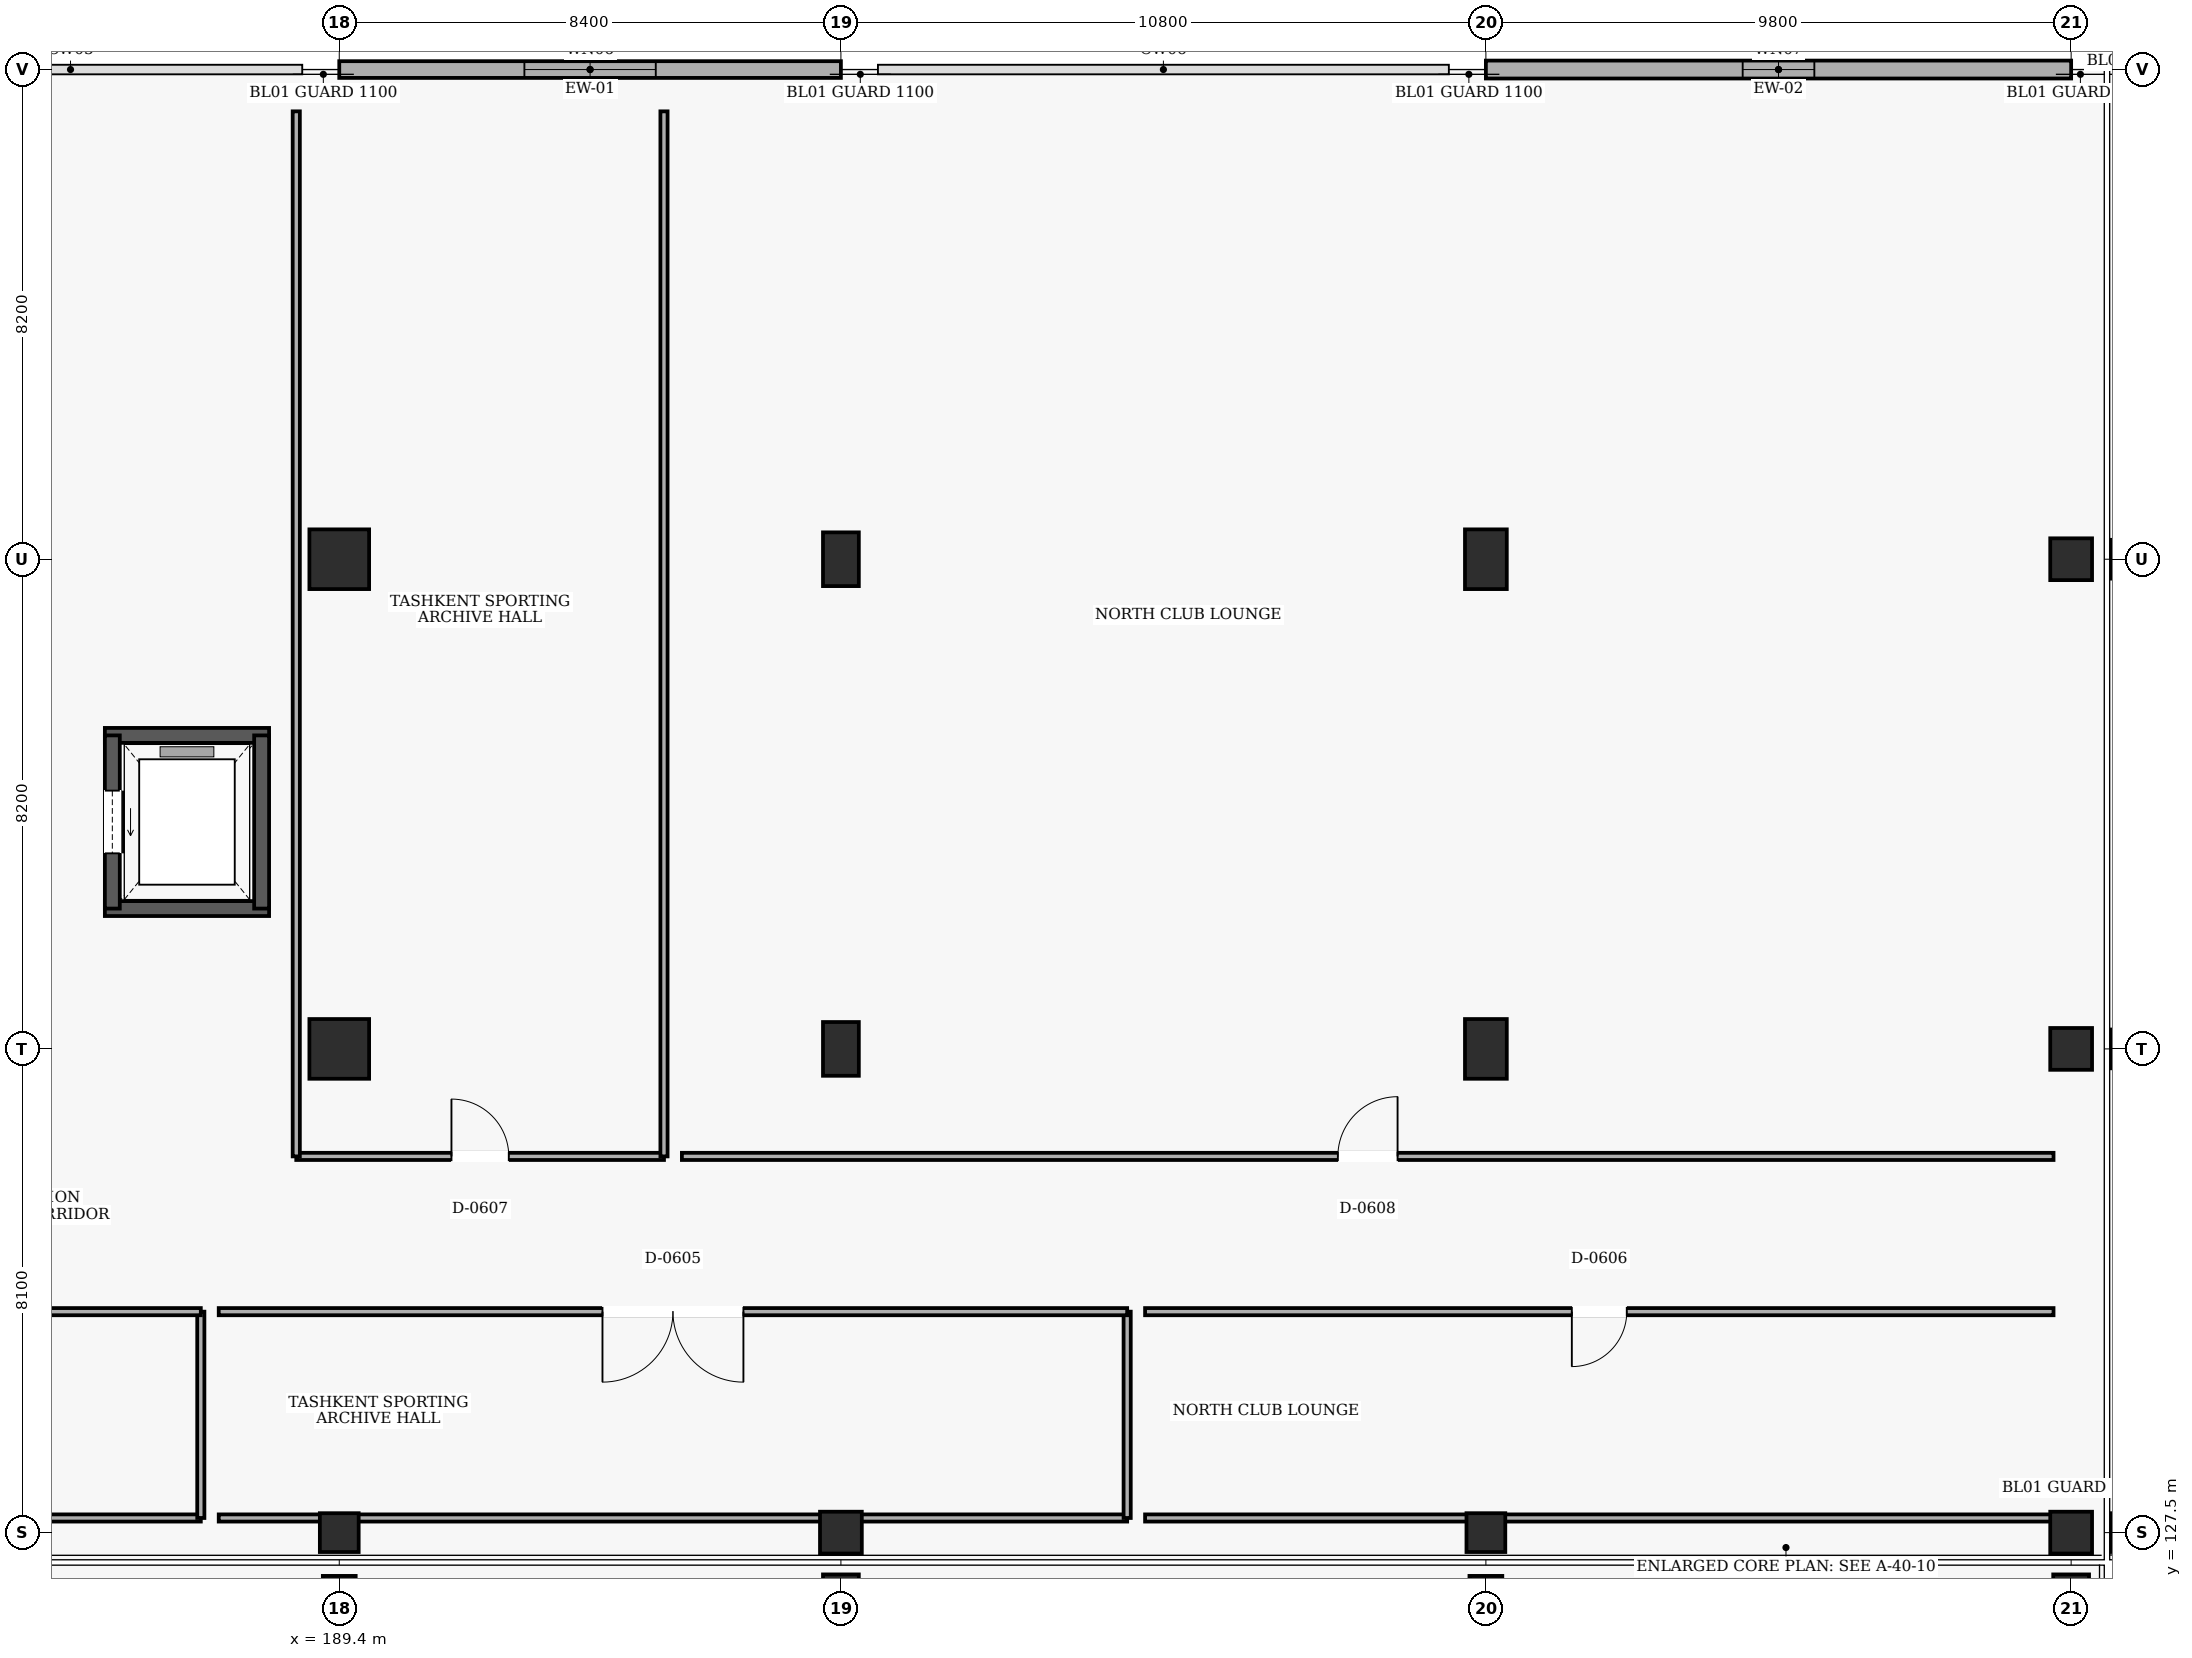
"""IFC4 building model, lengths in metres.
Left out: names, types, materials, properties, quantities, classifications, styles, units other than length and angle.
Written with IfcOpenShell. Run it as: python <this file> out.ifc"""

import sys

from ifc_helpers import new_model, si_unit, direction, frame, frame_2d, origin, origin_2d, place, context, subcontext, project, spatial, rectangle, extrude, element, fill, save


model = new_model("IFC4")
c1 = context("Model", 3, precision=1e-05, world=origin(), true_north=direction((0.0, 1.0)))
c2 = subcontext(c1, "Body", "Model", "MODEL_VIEW")
j1 = project(units=[si_unit("LENGTHUNIT", "METRE"), si_unit("PLANEANGLEUNIT", "RADIAN")], contexts=[c1])
p1 = place(None, origin())
s1 = spatial("IfcSite", under=j1, at=p1, CompositionType="ELEMENT")
p2 = place(p1, origin())
s2 = spatial("IfcBuilding", under=s1, at=p2, CompositionType="ELEMENT")
p3 = place(p2, frame((0.0, 0.0, 10.2)))
s3 = spatial("IfcBuildingStorey", under=s2, at=p3, CompositionType="ELEMENT", Elevation=10.2)
p4 = place(p3, frame((189.4, 126.5, 0.0), z_axis=(0.0, 0.0, 1.0), x_axis=(1.0, 0.0, 0.0)))
e1 = element("IfcColumn", 1, at=p4, inside=s3, PredefinedType="COLUMN", context=c2, shape_type="SweptSolid", body=[
    extrude(rectangle(XDim=0.55, YDim=0.55, at=origin_2d()), origin(), (0.0, 0.0, 1.0), 4.8),
])
p5 = place(p3, frame((189.4, 127.5, 0.0), z_axis=(0.0, 0.0, 1.0), x_axis=(1.0, 0.0, 0.0)))
e2 = element("IfcColumn", 2, at=p5, inside=s3, PredefinedType="COLUMN", context=c2, shape_type="SweptSolid", body=[
    extrude(rectangle(XDim=0.65, YDim=0.65, at=origin_2d()), origin(), (0.0, 0.0, 1.0), 4.8),
])
for number, where, z_axis, x_axis in (
    (3, (189.4, 135.6, 0.0), (0.0, 0.0, 1.0), (1.0, 0.0, 0.0)),
    (4, (189.4, 143.8, 0.0), (0.0, 0.0, 1.0), (1.0, 0.0, 0.0)),
):
    element("IfcColumn", number, at=place(p3, frame(where, z_axis=z_axis, x_axis=x_axis)), inside=s3, PredefinedType="COLUMN", context=c2, shape_type="SweptSolid", body=[
        extrude(rectangle(XDim=1.0, YDim=1.0, at=origin_2d()), origin(), (0.0, 0.0, 1.0), 4.8),
    ])
p6 = place(p3, frame((197.8, 126.5, 0.0), z_axis=(0.0, 0.0, 1.0), x_axis=(1.0, 0.0, 0.0)))
e5 = element("IfcColumn", 5, at=p6, inside=s3, PredefinedType="COLUMN", context=c2, shape_type="SweptSolid", body=[
    extrude(rectangle(XDim=0.6, YDim=0.6, at=origin_2d()), origin(), (0.0, 0.0, 1.0), 4.8),
])
p7 = place(p3, frame((197.8, 127.5, 0.0), z_axis=(0.0, 0.0, 1.0), x_axis=(1.0, 0.0, 0.0)))
e6 = element("IfcColumn", 6, at=p7, inside=s3, PredefinedType="COLUMN", context=c2, shape_type="SweptSolid", body=[
    extrude(rectangle(XDim=0.7, YDim=0.7, at=origin_2d()), origin(), (0.0, 0.0, 1.0), 4.8),
])
for number, where, z_axis, x_axis in (
    (7, (197.8, 135.6, 0.0), (0.0, 0.0, 1.0), (1.0, 0.0, 0.0)),
    (8, (197.8, 143.8, 0.0), (0.0, 0.0, 1.0), (1.0, 0.0, 0.0)),
):
    element("IfcColumn", number, at=place(p3, frame(where, z_axis=z_axis, x_axis=x_axis)), inside=s3, PredefinedType="COLUMN", context=c2, shape_type="SweptSolid", body=[
        extrude(rectangle(XDim=0.6, YDim=0.9, at=origin_2d()), origin(), (0.0, 0.0, 1.0), 4.8),
    ])
p8 = place(p3, frame((208.6, 126.5, 0.0), z_axis=(0.0, 0.0, 1.0), x_axis=(1.0, 0.0, 0.0)))
e9 = element("IfcColumn", 9, at=p8, inside=s3, PredefinedType="COLUMN", context=c2, shape_type="SweptSolid", body=[
    extrude(rectangle(XDim=0.55, YDim=0.55, at=origin_2d()), origin(), (0.0, 0.0, 1.0), 4.8),
])
p9 = place(p3, frame((208.6, 127.5, 0.0), z_axis=(0.0, 0.0, 1.0), x_axis=(1.0, 0.0, 0.0)))
e10 = element("IfcColumn", 10, at=p9, inside=s3, PredefinedType="COLUMN", context=c2, shape_type="SweptSolid", body=[
    extrude(rectangle(XDim=0.65, YDim=0.65, at=origin_2d()), origin(), (0.0, 0.0, 1.0), 4.8),
])
for number, where, z_axis, x_axis in (
    (11, (208.6, 135.6, 0.0), (0.0, 0.0, 1.0), (1.0, 0.0, 0.0)),
    (12, (208.6, 143.8, 0.0), (0.0, 0.0, 1.0), (1.0, 0.0, 0.0)),
):
    element("IfcColumn", number, at=place(p3, frame(where, z_axis=z_axis, x_axis=x_axis)), inside=s3, PredefinedType="COLUMN", context=c2, shape_type="SweptSolid", body=[
        extrude(rectangle(XDim=0.7, YDim=1.0, at=origin_2d()), origin(), (0.0, 0.0, 1.0), 4.8),
    ])
p10 = place(p3, frame((218.4, 126.5, 0.0), z_axis=(0.0, 0.0, 1.0), x_axis=(1.0, 0.0, 0.0)))
e13 = element("IfcColumn", 13, at=p10, inside=s3, PredefinedType="COLUMN", context=c2, shape_type="SweptSolid", body=[
    extrude(rectangle(XDim=0.6, YDim=0.6, at=origin_2d()), origin(), (0.0, 0.0, 1.0), 4.8),
])
for number, where, z_axis, x_axis in (
    (14, (218.4, 127.5, 0.0), (0.0, 0.0, 1.0), (1.0, 0.0, 0.0)),
    (15, (218.4, 135.6, 0.0), (0.0, 0.0, 1.0), (1.0, 0.0, 0.0)),
    (16, (218.4, 143.8, 0.0), (0.0, 0.0, 1.0), (1.0, 0.0, 0.0)),
):
    element("IfcColumn", number, at=place(p3, frame(where, z_axis=z_axis, x_axis=x_axis)), inside=s3, PredefinedType="COLUMN", context=c2, shape_type="SweptSolid", body=[
        extrude(rectangle(XDim=0.7, YDim=0.7, at=origin_2d()), origin(), (0.0, 0.0, 1.0), 4.8),
    ])
for number, where, z_axis, x_axis in (
    (17, (219.4, 127.5, 0.0), (0.0, 0.0, 1.0), (1.0, 0.0, 0.0)),
    (18, (219.4, 135.6, 0.0), (0.0, 0.0, 1.0), (1.0, 0.0, 0.0)),
    (19, (219.4, 143.8, 0.0), (0.0, 0.0, 1.0), (1.0, 0.0, 0.0)),
):
    element("IfcColumn", number, at=place(p3, frame(where, z_axis=z_axis, x_axis=x_axis)), inside=s3, PredefinedType="COLUMN", context=c2, shape_type="SweptSolid", body=[
        extrude(rectangle(XDim=0.65, YDim=0.65, at=origin_2d()), origin(), (0.0, 0.0, 1.0), 4.8),
    ])
p11 = place(p3, frame((189.4, 152.0, 0.0), z_axis=(0.0, 0.0, 1.0), x_axis=(1.0, 0.0, 0.0)))
e20 = element("IfcWall", 20, at=p11, inside=s3, PredefinedType="SOLIDWALL", context=c2, shape_type="SweptSolid", body=[
    extrude(rectangle(XDim=8.4, YDim=0.28, at=frame_2d((4.2, 0.0))), origin(), (0.0, 0.0, 1.0), 4.48),
])
p12 = place(p11, frame((3.1, 0.0, 0.9)))
e21 = element("IfcOpeningElement", 21, at=p12, cuts=e20, PredefinedType="OPENING", context=c2, shape_type="SweptSolid", body=[
    extrude(rectangle(XDim=2.2, YDim=1.5, at=frame_2d((1.1, 0.75))), frame((0.0, 0.15, 0.0), z_axis=(0.0, -1.0, 0.0), x_axis=(1.0, 0.0, 0.0)), (0.0, 0.0, 1.0), 0.3),
])
p13 = place(p3, frame((208.6, 152.0, 0.0), z_axis=(0.0, 0.0, 1.0), x_axis=(1.0, 0.0, 0.0)))
e22 = element("IfcWall", 22, at=p13, inside=s3, PredefinedType="SOLIDWALL", context=c2, shape_type="SweptSolid", body=[
    extrude(rectangle(XDim=9.8, YDim=0.3, at=frame_2d((4.9, 0.0))), origin(), (0.0, 0.0, 1.0), 4.48),
])
p14 = place(p13, frame((4.3, 0.0, 0.9)))
e23 = element("IfcOpeningElement", 23, at=p14, cuts=e22, PredefinedType="OPENING", context=c2, shape_type="SweptSolid", body=[
    extrude(rectangle(XDim=1.2, YDim=1.8, at=frame_2d((0.6, 0.9))), frame((0.0, 0.16, 0.0), z_axis=(0.0, -1.0, 0.0), x_axis=(1.0, 0.0, 0.0)), (0.0, 0.0, 1.0), 0.32),
])
for number, where, z_axis, x_axis in (
    (24, (185.475, 137.95, 0.0), (0.0, 0.0, 1.0), (1.0, 0.0, 0.0)),
    (25, (188.225, 140.85, 0.0), (0.0, 0.0, 1.0), (-1.0, 0.0, 0.0)),
):
    element("IfcWall", number, at=place(p3, frame(where, z_axis=z_axis, x_axis=x_axis)), inside=s3, PredefinedType="SHEAR", context=c2, shape_type="SweptSolid", body=[
        extrude(rectangle(XDim=2.75, YDim=0.25, at=frame_2d((1.375, 0.0))), origin(), (0.0, 0.0, 1.0), 4.48),
    ])
p15 = place(p3, frame((185.6, 140.85, 0.0), z_axis=(0.0, 0.0, 1.0), x_axis=(0.0, -1.0, 0.0)))
e26 = element("IfcWall", 26, at=p15, inside=s3, PredefinedType="SHEAR", context=c2, shape_type="SweptSolid", body=[
    extrude(rectangle(XDim=2.9, YDim=0.25, at=frame_2d((1.45, 0.0))), origin(), (0.0, 0.0, 1.0), 4.48),
])
p16 = place(p15, frame((0.925, 0.0, 0.0)))
e27 = element("IfcOpeningElement", 27, at=p16, cuts=e26, PredefinedType="OPENING", context=c2, shape_type="SweptSolid", body=[
    extrude(rectangle(XDim=1.05, YDim=2.15, at=frame_2d((0.525, 1.075))), frame((0.0, 0.135, 0.0), z_axis=(0.0, -1.0, 0.0), x_axis=(1.0, 0.0, 0.0)), (0.0, 0.0, 1.0), 0.27),
])
p17 = place(p3, frame((188.1, 137.95, 0.0), z_axis=(0.0, 0.0, 1.0), x_axis=(0.0, 1.0, 0.0)))
e28 = element("IfcWall", 28, at=p17, inside=s3, PredefinedType="SHEAR", context=c2, shape_type="SweptSolid", body=[
    extrude(rectangle(XDim=2.9, YDim=0.25, at=frame_2d((1.45, 0.0))), origin(), (0.0, 0.0, 1.0), 4.48),
])
p18 = place(p3, frame((171.87, 127.745, 0.0), z_axis=(0.0, 0.0, 1.0), x_axis=(1.0, 0.0, 0.0)))
e29 = element("IfcWall", 29, at=p18, inside=s3, PredefinedType="PARTITIONING", context=c2, shape_type="SweptSolid", body=[
    extrude(rectangle(XDim=15.212, YDim=0.12, at=frame_2d((7.606, 0.0))), origin(), (0.0, 0.0, 1.0), 3.86),
])
p19 = place(p3, frame((187.082, 127.745, 0.0), z_axis=(0.0, 0.0, 1.0), x_axis=(0.0, 1.0, 0.0)))
e30 = element("IfcWall", 30, at=p19, inside=s3, PredefinedType="PARTITIONING", context=c2, shape_type="SweptSolid", body=[
    extrude(rectangle(XDim=3.455, YDim=0.12, at=frame_2d((1.728, 0.0))), origin(), (0.0, 0.0, 1.0), 4.48),
])
p20 = place(p3, frame((187.082, 131.2, 0.0), z_axis=(0.0, 0.0, 1.0), x_axis=(-1.0, 0.0, 0.0)))
e31 = element("IfcWall", 31, at=p20, inside=s3, PredefinedType="PARTITIONING", context=c2, shape_type="SweptSolid", body=[
    extrude(rectangle(XDim=15.212, YDim=0.12, at=frame_2d((7.606, 0.0))), origin(), (0.0, 0.0, 1.0), 4.48),
])
p21 = place(p20, frame((6.466, 0.0, 0.0)))
e32 = element("IfcOpeningElement", 32, at=p21, cuts=e31, PredefinedType="OPENING", context=c2, shape_type="SweptSolid", body=[
    extrude(rectangle(XDim=2.28, YDim=2.4, at=frame_2d((1.14, 1.2))), frame((0.0, 0.07, 0.0), z_axis=(0.0, -1.0, 0.0), x_axis=(1.0, 0.0, 0.0)), (0.0, 0.0, 1.0), 0.14),
])
p22 = place(p3, frame((187.382, 127.745, 0.0), z_axis=(0.0, 0.0, 1.0), x_axis=(1.0, 0.0, 0.0)))
e33 = element("IfcWall", 33, at=p22, inside=s3, PredefinedType="PARTITIONING", context=c2, shape_type="SweptSolid", body=[
    extrude(rectangle(XDim=15.212, YDim=0.12, at=frame_2d((7.606, 0.0))), origin(), (0.0, 0.0, 1.0), 3.76),
])
p23 = place(p3, frame((202.593, 127.745, 0.0), z_axis=(0.0, 0.0, 1.0), x_axis=(0.0, 1.0, 0.0)))
e34 = element("IfcWall", 34, at=p23, inside=s3, PredefinedType="PARTITIONING", context=c2, shape_type="SweptSolid", body=[
    extrude(rectangle(XDim=3.455, YDim=0.12, at=frame_2d((1.728, 0.0))), origin(), (0.0, 0.0, 1.0), 4.48),
])
p24 = place(p3, frame((202.593, 131.2, 0.0), z_axis=(0.0, 0.0, 1.0), x_axis=(-1.0, 0.0, 0.0)))
e35 = element("IfcWall", 35, at=p24, inside=s3, PredefinedType="PARTITIONING", context=c2, shape_type="SweptSolid", body=[
    extrude(rectangle(XDim=15.212, YDim=0.12, at=frame_2d((7.606, 0.0))), origin(), (0.0, 0.0, 1.0), 4.48),
])
p25 = place(p24, frame((6.426, 0.0, 0.0)))
e36 = element("IfcOpeningElement", 36, at=p25, cuts=e35, PredefinedType="OPENING", context=c2, shape_type="SweptSolid", body=[
    extrude(rectangle(XDim=2.36, YDim=2.4, at=frame_2d((1.18, 1.2))), frame((0.0, 0.07, 0.0), z_axis=(0.0, -1.0, 0.0), x_axis=(1.0, 0.0, 0.0)), (0.0, 0.0, 1.0), 0.14),
])
p26 = place(p3, frame((202.893, 127.745, 0.0), z_axis=(0.0, 0.0, 1.0), x_axis=(1.0, 0.0, 0.0)))
e37 = element("IfcWall", 37, at=p26, inside=s3, PredefinedType="PARTITIONING", context=c2, shape_type="SweptSolid", body=[
    extrude(rectangle(XDim=15.212, YDim=0.12, at=frame_2d((7.606, 0.0))), origin(), (0.0, 0.0, 1.0), 3.76),
])
p27 = place(p3, frame((218.105, 131.2, 0.0), z_axis=(0.0, 0.0, 1.0), x_axis=(-1.0, 0.0, 0.0)))
e38 = element("IfcWall", 38, at=p27, inside=s3, PredefinedType="PARTITIONING", context=c2, shape_type="SweptSolid", body=[
    extrude(rectangle(XDim=15.212, YDim=0.12, at=frame_2d((7.606, 0.0))), origin(), (0.0, 0.0, 1.0), 4.48),
])
p28 = place(p27, frame((7.146, 0.0, 0.0)))
e39 = element("IfcOpeningElement", 39, at=p28, cuts=e38, PredefinedType="OPENING", context=c2, shape_type="SweptSolid", body=[
    extrude(rectangle(XDim=0.92, YDim=2.1, at=frame_2d((0.46, 1.05))), frame((0.0, 0.07, 0.0), z_axis=(0.0, -1.0, 0.0), x_axis=(1.0, 0.0, 0.0)), (0.0, 0.0, 1.0), 0.14),
])
p29 = place(p3, frame((188.68, 133.8, 0.0), z_axis=(0.0, 0.0, 1.0), x_axis=(1.0, 0.0, 0.0)))
e40 = element("IfcWall", 40, at=p29, inside=s3, PredefinedType="PARTITIONING", context=c2, shape_type="SweptSolid", body=[
    extrude(rectangle(XDim=6.157, YDim=0.12, at=frame_2d((3.079, 0.0))), origin(), (0.0, 0.0, 1.0), 4.48),
])
p30 = place(p29, frame((2.599, 0.0, 0.0)))
e41 = element("IfcOpeningElement", 41, at=p30, cuts=e40, PredefinedType="OPENING", context=c2, shape_type="SweptSolid", body=[
    extrude(rectangle(XDim=0.96, YDim=2.1, at=frame_2d((0.48, 1.05))), frame((0.0, 0.07, 0.0), z_axis=(0.0, -1.0, 0.0), x_axis=(1.0, 0.0, 0.0)), (0.0, 0.0, 1.0), 0.14),
])
for number, where, z_axis, x_axis in (
    (42, (194.837, 133.8, 0.0), (0.0, 0.0, 1.0), (0.0, 1.0, 0.0)),
    (43, (188.68, 151.3, 0.0), (0.0, 0.0, 1.0), (0.0, -1.0, 0.0)),
):
    element("IfcWall", number, at=place(p3, frame(where, z_axis=z_axis, x_axis=x_axis)), inside=s3, PredefinedType="PARTITIONING", context=c2, shape_type="SweptSolid", body=[
        extrude(rectangle(XDim=17.5, YDim=0.12, at=frame_2d((8.75, 0.0))), origin(), (0.0, 0.0, 1.0), 4.48),
    ])
p31 = place(p3, frame((195.137, 133.8, 0.0), z_axis=(0.0, 0.0, 1.0), x_axis=(1.0, 0.0, 0.0)))
e44 = element("IfcWall", 44, at=p31, inside=s3, PredefinedType="PARTITIONING", context=c2, shape_type="SweptSolid", body=[
    extrude(rectangle(XDim=22.968, YDim=0.12, at=frame_2d((11.484, 0.0))), origin(), (0.0, 0.0, 1.0), 4.48),
])
p32 = place(p31, frame((10.984, 0.0, 0.0)))
e45 = element("IfcOpeningElement", 45, at=p32, cuts=e44, PredefinedType="OPENING", context=c2, shape_type="SweptSolid", body=[
    extrude(rectangle(XDim=1.0, YDim=2.1, at=frame_2d((0.5, 1.05))), frame((0.0, 0.07, 0.0), z_axis=(0.0, -1.0, 0.0), x_axis=(1.0, 0.0, 0.0)), (0.0, 0.0, 1.0), 0.14),
])
p33 = place(p12, origin())
e46 = element("IfcWindow", 46, at=p33, inside=s3, PartitioningType="SINGLE_PANEL", PredefinedType="WINDOW", context=c2, shape_type="SweptSolid", body=[
    extrude(rectangle(XDim=2.2, YDim=1.5, at=frame_2d((1.1, 0.75))), frame((0.0, 0.03, 0.0), z_axis=(0.0, -1.0, 0.0), x_axis=(1.0, 0.0, 0.0)), (0.0, 0.0, 1.0), 0.06),
])
fill(e21, e46)
p34 = place(p14, origin())
e47 = element("IfcWindow", 47, at=p34, inside=s3, PartitioningType="SINGLE_PANEL", PredefinedType="WINDOW", context=c2, shape_type="SweptSolid", body=[
    extrude(rectangle(XDim=1.2, YDim=1.8, at=frame_2d((0.6, 0.9))), frame((0.0, 0.03, 0.0), z_axis=(0.0, -1.0, 0.0), x_axis=(1.0, 0.0, 0.0)), (0.0, 0.0, 1.0), 0.06),
])
fill(e23, e47)
p35 = place(p16, origin())
e48 = element("IfcDoor", 48, at=p35, inside=s3, OperationType="SLIDING_TO_LEFT", PredefinedType="DOOR", context=c2, shape_type="SweptSolid", body=[
    extrude(rectangle(XDim=1.05, YDim=2.15, at=frame_2d((0.525, 1.075))), frame((0.0, 0.025, 0.0), z_axis=(0.0, -1.0, 0.0), x_axis=(1.0, 0.0, 0.0)), (0.0, 0.0, 1.0), 0.05),
])
fill(e27, e48)
p36 = place(p25, origin())
e49 = element("IfcDoor", 49, at=p36, inside=s3, OperationType="DOUBLE_DOOR_SINGLE_SWING", PredefinedType="DOOR", context=c2, shape_type="SweptSolid", body=[
    extrude(rectangle(XDim=2.36, YDim=2.4, at=frame_2d((1.18, 1.2))), frame((0.0, 0.025, 0.0), z_axis=(0.0, -1.0, 0.0), x_axis=(1.0, 0.0, 0.0)), (0.0, 0.0, 1.0), 0.05),
])
fill(e36, e49)
p37 = place(p28, origin())
e50 = element("IfcDoor", 50, at=p37, inside=s3, OperationType="SINGLE_SWING_RIGHT", PredefinedType="DOOR", context=c2, shape_type="SweptSolid", body=[
    extrude(rectangle(XDim=0.92, YDim=2.1, at=frame_2d((0.46, 1.05))), frame((0.0, 0.025, 0.0), z_axis=(0.0, -1.0, 0.0), x_axis=(1.0, 0.0, 0.0)), (0.0, 0.0, 1.0), 0.05),
])
fill(e39, e50)
p38 = place(p30, origin())
e51 = element("IfcDoor", 51, at=p38, inside=s3, OperationType="SINGLE_SWING_LEFT", PredefinedType="DOOR", context=c2, shape_type="SweptSolid", body=[
    extrude(rectangle(XDim=0.96, YDim=2.1, at=frame_2d((0.48, 1.05))), frame((0.0, 0.025, 0.0), z_axis=(0.0, -1.0, 0.0), x_axis=(1.0, 0.0, 0.0)), (0.0, 0.0, 1.0), 0.05),
])
fill(e41, e51)
p39 = place(p32, origin())
e52 = element("IfcDoor", 52, at=p39, inside=s3, OperationType="SINGLE_SWING_RIGHT", PredefinedType="DOOR", context=c2, shape_type="SweptSolid", body=[
    extrude(rectangle(XDim=1.0, YDim=2.1, at=frame_2d((0.5, 1.05))), frame((0.0, 0.025, 0.0), z_axis=(0.0, -1.0, 0.0), x_axis=(1.0, 0.0, 0.0)), (0.0, 0.0, 1.0), 0.05),
])
fill(e45, e52)
save(model, sys.argv[1])
